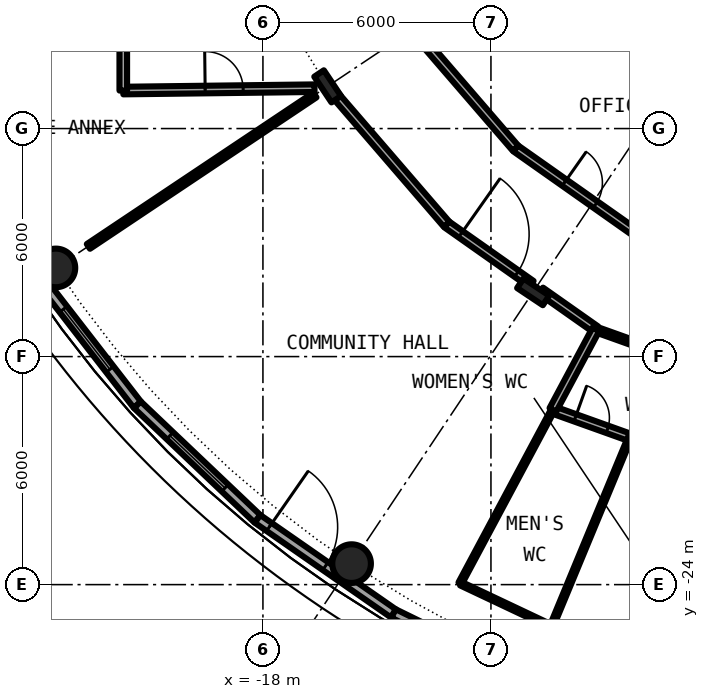
"""IFC4 building model, lengths in metres.
Left out: names, types, materials, properties, quantities, classifications, styles, units other than length and angle.
Written with IfcOpenShell. Run it as: python <this file> out.ifc"""

import sys

from ifc_helpers import new_model, si_unit, direction, frame, frame_2d, origin, origin_2d, place, context, subcontext, project, spatial, rectangle, hollow_circle, i_section, extrude, element, fill, save


model = new_model("IFC4")
c1 = context("Model", 3, precision=1e-05, world=origin(), true_north=direction((0.0, 1.0)))
c2 = subcontext(c1, "Body", "Model", "MODEL_VIEW")
j1 = project(units=[si_unit("LENGTHUNIT", "METRE"), si_unit("PLANEANGLEUNIT", "RADIAN")], contexts=[c1])
p1 = place(None, origin())
s1 = spatial("IfcSite", under=j1, at=p1, CompositionType="ELEMENT")
p2 = place(p1, origin())
s2 = spatial("IfcBuilding", under=s1, at=p2, CompositionType="ELEMENT")
p3 = place(p2, frame((0.0, 0.0, 9.6)))
s3 = spatial("IfcBuildingStorey", under=s2, at=p3, CompositionType="ELEMENT", Elevation=9.6)
for number, where, z_axis, x_axis in (
    (1, (-23.448, -15.667, 0.0), (0.0, 0.0, 1.0), (1.0, 0.0, 0.0)),
    (2, (-15.667, -23.448, 0.0), (0.0, 0.0, 1.0), (1.0, 0.0, 0.0)),
):
    element("IfcColumn", number, at=place(p3, frame(where, z_axis=z_axis, x_axis=x_axis)), inside=s3, PredefinedType="COLUMN", context=c2, shape_type="SweptSolid", body=[
        extrude(hollow_circle(Radius=0.508, WallThickness=0.05, at=origin_2d()), origin(), (0.0, 0.0, 1.0), 4.5),
    ])
for number, where, z_axis, x_axis in (
    (3, (-16.297, -10.889, 0.0), (0.0, 0.0, 1.0), (-0.831, -0.556, 0.0)),
    (4, (-10.889, -16.297, 0.0), (0.0, 0.0, 1.0), (-0.556, -0.831, 0.0)),
):
    element("IfcColumn", number, at=place(p3, frame(where, z_axis=z_axis, x_axis=x_axis)), inside=s3, PredefinedType="COLUMN", context=c2, shape_type="SweptSolid", body=[
        extrude(i_section(OverallWidth=0.303, OverallDepth=0.814, WebThickness=0.021, FlangeThickness=0.04, FilletRadius=0.03, at=origin_2d()), origin(), (0.0, 0.0, 1.0), 4.5),
    ])
p4 = place(p3, frame((-23.975, -15.822, 0.0), z_axis=(0.0, 0.0, 1.0), x_axis=(0.612637256412, -0.790364214812, 0.0)))
e5 = element("IfcWall", 5, at=p4, inside=s3, PredefinedType="SOLIDWALL", context=c2, shape_type="SweptSolid", body=[
    extrude(rectangle(XDim=4.36, YDim=0.25, at=frame_2d((2.18, 0.0))), origin(), (0.0, 0.0, 1.0), 4.05),
])
p5 = place(p4, frame((1.18, 0.0, 0.9)))
e6 = element("IfcOpeningElement", 6, at=p5, cuts=e5, PredefinedType="OPENING", context=c2, shape_type="SweptSolid", body=[
    extrude(rectangle(XDim=2.0, YDim=2.4, at=frame_2d((1.0, 1.2))), frame((0.0, 0.135, 0.0), z_axis=(0.0, -1.0, 0.0), x_axis=(1.0, 0.0, 0.0)), (0.0, 0.0, 1.0), 0.27),
])
p6 = place(p3, frame((-21.304, -19.268, 0.0), z_axis=(0.0, 0.0, 1.0), x_axis=(0.725101501119, -0.68864200647, 0.0)))
e7 = element("IfcWall", 7, at=p6, inside=s3, PredefinedType="SOLIDWALL", context=c2, shape_type="SweptSolid", body=[
    extrude(rectangle(XDim=4.359, YDim=0.25, at=frame_2d((2.18, 0.0))), origin(), (0.0, 0.0, 1.0), 4.05),
])
p7 = place(p6, frame((1.18, 0.0, 0.9)))
e8 = element("IfcOpeningElement", 8, at=p7, cuts=e7, PredefinedType="OPENING", context=c2, shape_type="SweptSolid", body=[
    extrude(rectangle(XDim=2.0, YDim=2.4, at=frame_2d((1.0, 1.2))), frame((0.0, 0.135, 0.0), z_axis=(0.0, -1.0, 0.0), x_axis=(1.0, 0.0, 0.0)), (0.0, 0.0, 1.0), 0.27),
])
p8 = place(p3, frame((-18.143, -22.27, 0.0), z_axis=(0.0, 0.0, 1.0), x_axis=(0.820990800869, -0.57094141984, 0.0)))
e9 = element("IfcWall", 9, at=p8, inside=s3, PredefinedType="SOLIDWALL", context=c2, shape_type="SweptSolid", body=[
    extrude(rectangle(XDim=4.359, YDim=0.25, at=frame_2d((2.18, 0.0))), origin(), (0.0, 0.0, 1.0), 4.05),
])
p9 = place(p8, frame((0.377, 0.0, 0.0)))
e10 = element("IfcOpeningElement", 10, at=p9, cuts=e9, PredefinedType="OPENING", context=c2, shape_type="SweptSolid", body=[
    extrude(rectangle(XDim=1.8, YDim=2.2, at=frame_2d((0.9, 1.1))), frame((0.0, 0.135, 0.0), z_axis=(0.0, -1.0, 0.0), x_axis=(1.0, 0.0, 0.0)), (0.0, 0.0, 1.0), 0.27),
])
p10 = place(p3, frame((-14.564, -24.759, 0.0), z_axis=(0.0, 0.0, 1.0), x_axis=(0.897938079481, -0.440121807478, 0.0)))
e11 = element("IfcWall", 11, at=p10, inside=s3, PredefinedType="SOLIDWALL", context=c2, shape_type="SweptSolid", body=[
    extrude(rectangle(XDim=4.36, YDim=0.25, at=frame_2d((2.18, 0.0))), origin(), (0.0, 0.0, 1.0), 4.05),
])
p11 = place(p10, frame((1.18, 0.0, 0.9)))
e12 = element("IfcOpeningElement", 12, at=p11, cuts=e11, PredefinedType="OPENING", context=c2, shape_type="SweptSolid", body=[
    extrude(rectangle(XDim=2.0, YDim=2.4, at=frame_2d((1.0, 1.2))), frame((0.0, 0.135, 0.0), z_axis=(0.0, -1.0, 0.0), x_axis=(1.0, 0.0, 0.0)), (0.0, 0.0, 1.0), 0.27),
])
p12 = place(p3, frame((-10.373, -19.401, 0.0), z_axis=(0.0, 0.0, 1.0), x_axis=(0.941534771306, -0.336915826909, 0.0)))
e13 = element("IfcWall", 13, at=p12, inside=s3, PredefinedType="PARTITIONING", context=c2, shape_type="SweptSolid", body=[
    extrude(rectangle(XDim=6.459, YDim=0.2, at=frame_2d((3.229, 0.0))), origin(), (0.0, 0.0, 1.0), 4.05),
])
p13 = place(p12, frame((0.627, 0.0, 0.0)))
e14 = element("IfcOpeningElement", 14, at=p13, cuts=e13, PredefinedType="OPENING", context=c2, shape_type="SweptSolid", body=[
    extrude(rectangle(XDim=0.9, YDim=2.3, at=frame_2d((0.45, 1.15))), frame((0.0, 0.11, 0.0), z_axis=(0.0, -1.0, 0.0), x_axis=(1.0, 0.0, 0.0)), (0.0, 0.0, 1.0), 0.22),
])
p14 = place(p12, frame((2.781, 0.0, 0.0)))
e15 = element("IfcOpeningElement", 15, at=p14, cuts=e13, PredefinedType="OPENING", context=c2, shape_type="SweptSolid", body=[
    extrude(rectangle(XDim=0.9, YDim=2.3, at=frame_2d((0.45, 1.15))), frame((0.0, 0.11, 0.0), z_axis=(0.0, -1.0, 0.0), x_axis=(1.0, 0.0, 0.0)), (0.0, 0.0, 1.0), 0.22),
])
p15 = place(p12, frame((4.933, 0.0, 0.0)))
e16 = element("IfcOpeningElement", 16, at=p15, cuts=e13, PredefinedType="OPENING", context=c2, shape_type="SweptSolid", body=[
    extrude(rectangle(XDim=0.9, YDim=2.3, at=frame_2d((0.45, 1.15))), frame((0.0, 0.11, 0.0), z_axis=(0.0, -1.0, 0.0), x_axis=(1.0, 0.0, 0.0)), (0.0, 0.0, 1.0), 0.22),
])
p16 = place(p3, frame((-16.197, -11.005, 0.0), z_axis=(0.0, 0.0, 1.0), x_axis=(0.653077876854, -0.757290754443, 0.0)))
e17 = element("IfcWall", 17, at=p16, inside=s3, PredefinedType="PARTITIONING", context=c2, shape_type="SweptSolid", body=[
    extrude(rectangle(XDim=4.646, YDim=0.2, at=frame_2d((2.323, 0.0))), origin(), (0.0, 0.0, 1.0), 3.63),
])
p17 = place(p3, frame((-13.163, -14.523, 0.0), z_axis=(0.0, 0.0, 1.0), x_axis=(0.817595540973, -0.575792958781, 0.0)))
e18 = element("IfcWall", 18, at=p17, inside=s3, PredefinedType="PARTITIONING", context=c2, shape_type="SweptSolid", body=[
    extrude(rectangle(XDim=2.725, YDim=0.2, at=frame_2d((1.363, 0.0))), origin(), (0.0, 0.0, 1.0), 3.63),
])
p18 = place(p17, frame((0.45, 0.0, 0.0)))
e19 = element("IfcOpeningElement", 19, at=p18, cuts=e18, PredefinedType="OPENING", context=c2, shape_type="SweptSolid", body=[
    extrude(rectangle(XDim=1.8, YDim=2.3, at=frame_2d((0.9, 1.15))), frame((0.0, 0.11, 0.0), z_axis=(0.0, -1.0, 0.0), x_axis=(1.0, 0.0, 0.0)), (0.0, 0.0, 1.0), 0.22),
])
p19 = place(p3, frame((-10.687, -16.267, 0.0), z_axis=(0.0, 0.0, 1.0), x_axis=(0.817849682833, -0.575431921508, 0.0)))
e20 = element("IfcWall", 20, at=p19, inside=s3, PredefinedType="PARTITIONING", context=c2, shape_type="SweptSolid", body=[
    extrude(rectangle(XDim=1.771, YDim=0.2, at=frame_2d((0.885, 0.0))), origin(), (0.0, 0.0, 1.0), 3.63),
])
p20 = place(p3, frame((-9.239, -17.286, 0.0), z_axis=(0.0, 0.0, 1.0), x_axis=(0.941530584678, -0.336927526504, 0.0)))
e21 = element("IfcWall", 21, at=p20, inside=s3, PredefinedType="PARTITIONING", context=c2, shape_type="SweptSolid", body=[
    extrude(rectangle(XDim=5.598, YDim=0.15, at=frame_2d((2.799, 0.0))), origin(), (0.0, 0.0, 1.0), 3.63),
])
p21 = place(p20, frame((2.376, 0.0, 0.0)))
e22 = element("IfcOpeningElement", 22, at=p21, cuts=e21, PredefinedType="OPENING", context=c2, shape_type="SweptSolid", body=[
    extrude(rectangle(XDim=1.0, YDim=2.3, at=frame_2d((0.5, 1.15))), frame((0.0, 0.085, 0.0), z_axis=(0.0, -1.0, 0.0), x_axis=(1.0, 0.0, 0.0)), (0.0, 0.0, 1.0), 0.17),
])
p22 = place(p3, frame((-14.043, -9.4, 0.0), z_axis=(0.0, 0.0, 1.0), x_axis=(0.653274518104, -0.757121129012, 0.0)))
e23 = element("IfcWall", 23, at=p22, inside=s3, PredefinedType="PARTITIONING", context=c2, shape_type="SweptSolid", body=[
    extrude(rectangle(XDim=4.124, YDim=0.2, at=frame_2d((2.062, 0.0))), origin(), (0.0, 0.0, 1.0), 4.05),
])
p23 = place(p3, frame((-11.349, -12.522, 0.0), z_axis=(0.0, 0.0, 1.0), x_axis=(0.817567680547, -0.575832517079, 0.0)))
e24 = element("IfcWall", 24, at=p23, inside=s3, PredefinedType="PARTITIONING", context=c2, shape_type="SweptSolid", body=[
    extrude(rectangle(XDim=4.137, YDim=0.2, at=frame_2d((2.068, 0.0))), origin(), (0.0, 0.0, 1.0), 4.05),
])
p24 = place(p23, frame((1.568, 0.0, 0.0)))
e25 = element("IfcOpeningElement", 25, at=p24, cuts=e24, PredefinedType="OPENING", context=c2, shape_type="SweptSolid", body=[
    extrude(rectangle(XDim=1.0, YDim=2.3, at=frame_2d((0.5, 1.15))), frame((0.0, 0.11, 0.0), z_axis=(0.0, -1.0, 0.0), x_axis=(1.0, 0.0, 0.0)), (0.0, 0.0, 1.0), 0.22),
])
p25 = place(p3, frame((-21.675, -11.0, 0.0), z_axis=(0.0, 0.0, 1.0), x_axis=(0.999924074118, 0.012322580895, 0.0)))
e26 = element("IfcWall", 26, at=p25, inside=s3, PredefinedType="PARTITIONING", context=c2, shape_type="SweptSolid", body=[
    extrude(rectangle(XDim=5.032, YDim=0.2, at=frame_2d((2.516, 0.0))), origin(), (0.0, 0.0, 1.0), 4.05),
])
p26 = place(p25, frame((2.155, 0.0, 0.0)))
e27 = element("IfcOpeningElement", 27, at=p26, cuts=e26, PredefinedType="OPENING", context=c2, shape_type="SweptSolid", body=[
    extrude(rectangle(XDim=1.0, YDim=2.3, at=frame_2d((0.5, 1.15))), frame((0.0, 0.11, 0.0), z_axis=(0.0, -1.0, 0.0), x_axis=(1.0, 0.0, 0.0)), (0.0, 0.0, 1.0), 0.22),
])
p27 = place(p3, frame((-22.593, -15.101, 0.0), z_axis=(0.0, 0.0, 1.0), x_axis=(0.831415754305, 0.555650828752, 0.0)))
e28 = element("IfcWall", 28, at=p27, inside=s3, PredefinedType="PARTITIONING", context=c2, shape_type="SweptSolid", body=[
    extrude(rectangle(XDim=7.168, YDim=0.15, at=frame_2d((3.584, 0.0))), origin(), (0.0, 0.0, 1.0), 4.05),
])
p28 = place(p3, frame((-12.81, -23.966, 0.0), z_axis=(0.0, 0.0, 1.0), x_axis=(0.471464572183, 0.88188500224, 0.0)))
e29 = element("IfcWall", 29, at=p28, inside=s3, PredefinedType="PARTITIONING", context=c2, shape_type="SweptSolid", body=[
    extrude(rectangle(XDim=5.175, YDim=0.1, at=frame_2d((2.588, 0.0))), origin(), (0.0, 0.0, 1.0), 4.05),
])
p29 = place(p3, frame((-10.407, -25.103, 0.0), z_axis=(0.0, 0.0, 1.0), x_axis=(0.382973519041, 0.923759321313, 0.0)))
e30 = element("IfcWall", 30, at=p29, inside=s3, PredefinedType="PARTITIONING", context=c2, shape_type="SweptSolid", body=[
    extrude(rectangle(XDim=5.387, YDim=0.1, at=frame_2d((2.693, 0.0))), origin(), (0.0, 0.0, 1.0), 4.05),
])
p30 = place(p3, frame((-10.37, -19.402, 0.0), z_axis=(0.0, 0.0, 1.0), x_axis=(0.471385457832, 0.881927293004, 0.0)))
e31 = element("IfcWall", 31, at=p30, inside=s3, PredefinedType="PARTITIONING", context=c2, shape_type="SweptSolid", body=[
    extrude(rectangle(XDim=2.399, YDim=0.2, at=frame_2d((1.2, 0.0))), origin(), (0.0, 0.0, 1.0), 4.05),
])
p31 = place(p3, frame((-21.675, -11.0, 0.0), z_axis=(0.0, 0.0, 1.0), x_axis=(0.0, 1.0, 0.0)))
e32 = element("IfcWall", 32, at=p31, inside=s3, PredefinedType="PARTITIONING", context=c2, shape_type="SweptSolid", body=[
    extrude(rectangle(XDim=1.6, YDim=0.2, at=frame_2d((0.8, 0.0))), origin(), (0.0, 0.0, 1.0), 4.05),
])
p32 = place(p3, frame((-10.425, -25.094, 0.0), z_axis=(0.0, 0.0, 1.0), x_axis=(-0.904075542006, 0.427372687882, 0.0)))
e33 = element("IfcWall", 33, at=p32, inside=s3, PredefinedType="PARTITIONING", context=c2, shape_type="SweptSolid", body=[
    extrude(rectangle(XDim=2.618, YDim=0.1, at=frame_2d((1.309, 0.0))), origin(), (0.0, 0.0, 1.0), 4.05),
])
p33 = place(p5, origin())
e34 = element("IfcWindow", 34, at=p33, inside=s3, PartitioningType="SINGLE_PANEL", PredefinedType="WINDOW", context=c2, shape_type="SweptSolid", body=[
    extrude(rectangle(XDim=2.0, YDim=2.4, at=frame_2d((1.0, 1.2))), frame((0.0, 0.03, 0.0), z_axis=(0.0, -1.0, 0.0), x_axis=(1.0, 0.0, 0.0)), (0.0, 0.0, 1.0), 0.06),
])
fill(e6, e34)
p34 = place(p7, origin())
e35 = element("IfcWindow", 35, at=p34, inside=s3, PartitioningType="SINGLE_PANEL", PredefinedType="WINDOW", context=c2, shape_type="SweptSolid", body=[
    extrude(rectangle(XDim=2.0, YDim=2.4, at=frame_2d((1.0, 1.2))), frame((0.0, 0.03, 0.0), z_axis=(0.0, -1.0, 0.0), x_axis=(1.0, 0.0, 0.0)), (0.0, 0.0, 1.0), 0.06),
])
fill(e8, e35)
p35 = place(p9, origin())
e36 = element("IfcDoor", 36, at=p35, inside=s3, OperationType="SINGLE_SWING_LEFT", PredefinedType="DOOR", context=c2, shape_type="SweptSolid", body=[
    extrude(rectangle(XDim=1.8, YDim=2.2, at=frame_2d((0.9, 1.1))), frame((0.0, 0.025, 0.0), z_axis=(0.0, -1.0, 0.0), x_axis=(1.0, 0.0, 0.0)), (0.0, 0.0, 1.0), 0.05),
])
fill(e10, e36)
p36 = place(p13, origin())
e37 = element("IfcDoor", 37, at=p36, inside=s3, OperationType="SINGLE_SWING_LEFT", PredefinedType="DOOR", context=c2, shape_type="SweptSolid", body=[
    extrude(rectangle(XDim=0.9, YDim=2.3, at=frame_2d((0.45, 1.15))), frame((0.0, 0.025, 0.0), z_axis=(0.0, -1.0, 0.0), x_axis=(1.0, 0.0, 0.0)), (0.0, 0.0, 1.0), 0.05),
])
fill(e14, e37)
p37 = place(p18, origin())
e38 = element("IfcDoor", 38, at=p37, inside=s3, OperationType="DOUBLE_DOOR_SINGLE_SWING", PredefinedType="DOOR", context=c2, shape_type="SweptSolid", body=[
    extrude(rectangle(XDim=1.8, YDim=2.3, at=frame_2d((0.9, 1.15))), frame((0.0, 0.025, 0.0), z_axis=(0.0, -1.0, 0.0), x_axis=(1.0, 0.0, 0.0)), (0.0, 0.0, 1.0), 0.05),
])
fill(e19, e38)
p38 = place(p24, origin())
e39 = element("IfcDoor", 39, at=p38, inside=s3, OperationType="SINGLE_SWING_RIGHT", PredefinedType="DOOR", context=c2, shape_type="SweptSolid", body=[
    extrude(rectangle(XDim=1.0, YDim=2.3, at=frame_2d((0.5, 1.15))), frame((0.0, 0.025, 0.0), z_axis=(0.0, -1.0, 0.0), x_axis=(1.0, 0.0, 0.0)), (0.0, 0.0, 1.0), 0.05),
])
fill(e25, e39)
p39 = place(p26, origin())
e40 = element("IfcDoor", 40, at=p39, inside=s3, OperationType="SINGLE_SWING_RIGHT", PredefinedType="DOOR", context=c2, shape_type="SweptSolid", body=[
    extrude(rectangle(XDim=1.0, YDim=2.3, at=frame_2d((0.5, 1.15))), frame((0.0, 0.025, 0.0), z_axis=(0.0, -1.0, 0.0), x_axis=(1.0, 0.0, 0.0)), (0.0, 0.0, 1.0), 0.05),
])
fill(e27, e40)
save(model, sys.argv[1])
